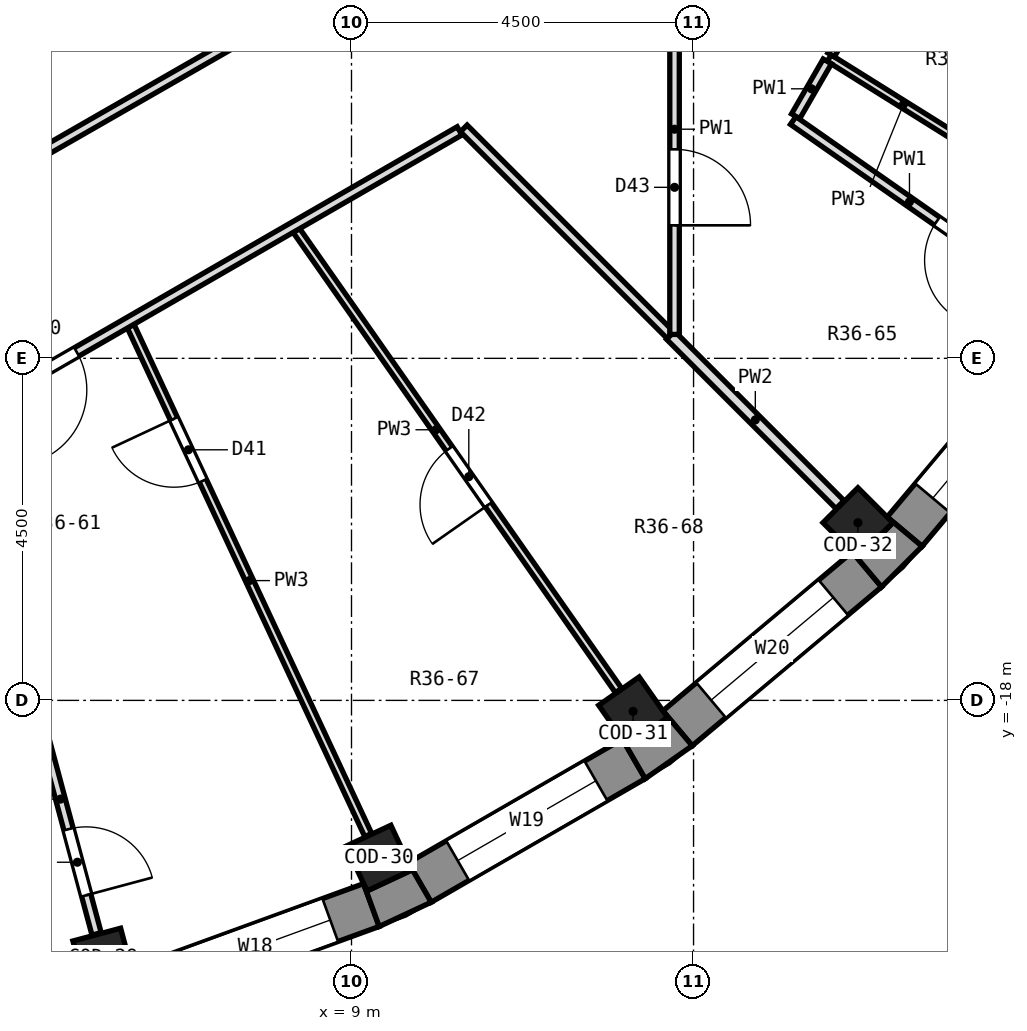
"""IFC4 building model, lengths in metres.
Left out: names, types, materials, properties, quantities, classifications, styles, units other than length and angle.
Written with IfcOpenShell. Run it as: python <this file> out.ifc"""

import sys

from ifc_helpers import new_model, si_unit, direction, frame, frame_2d, origin, origin_2d, place, context, subcontext, project, spatial, polyline, rectangle, outline, extrude, element, fill, save


model = new_model("IFC4")
c1 = context("Model", 3, precision=1e-05, world=origin(), true_north=direction((0.0, 1.0)))
c2 = subcontext(c1, "Body", "Model", "MODEL_VIEW")
j1 = project(units=[si_unit("LENGTHUNIT", "METRE"), si_unit("PLANEANGLEUNIT", "RADIAN")], contexts=[c1])
p1 = place(None, origin())
s1 = spatial("IfcSite", under=j1, at=p1, CompositionType="ELEMENT")
p2 = place(p1, origin())
s2 = spatial("IfcBuilding", under=s1, at=p2, CompositionType="ELEMENT")
p3 = place(p2, frame((0.0, 0.0, 259.4)))
s3 = spatial("IfcBuildingStorey", under=s2, at=p3, CompositionType="ELEMENT", Elevation=259.4)
for number, where, z_axis, x_axis in (
    (1, (5.733, -21.395, 0.0), (0.0, 0.0, 1.0), (0.259, -0.966, 0.0)),
    (2, (9.361, -20.075, 0.0), (0.0, 0.0, 1.0), (0.423, -0.906, 0.0)),
    (3, (12.705, -18.144, 0.0), (0.0, 0.0, 1.0), (0.574, -0.819, 0.0)),
    (4, (15.662, -15.662, 0.0), (0.0, 0.0, 1.0), (0.707, -0.707, 0.0)),
):
    element("IfcColumn", number, at=place(p3, frame(where, z_axis=z_axis, x_axis=x_axis)), inside=s3, PredefinedType="COLUMN", context=c2, shape_type="SweptSolid", body=[
        extrude(rectangle(XDim=0.65, YDim=0.65, at=origin_2d()), origin(), (0.0, 0.0, 1.0), 3.3),
    ])
p4 = place(p3, frame((6.206, -21.805, 0.0), z_axis=(0.0, 0.0, 1.0), x_axis=(0.939679383794, 0.342056509473, 0.0)))
e5 = element("IfcWall", 5, at=p4, inside=s3, PredefinedType="SOLIDWALL", context=c2, shape_type="SweptSolid", body=[
    extrude(rectangle(XDim=3.252, YDim=0.6, at=frame_2d((1.626, 0.0))), origin(), (0.0, 0.0, 1.0), 2.9),
])
p5 = place(p4, frame((0.576, 0.0, 0.9)))
e6 = element("IfcOpeningElement", 6, at=p5, cuts=e5, PredefinedType="OPENING", context=c2, shape_type="SweptSolid", body=[
    extrude(rectangle(XDim=2.1, YDim=1.8, at=frame_2d((1.05, 0.9))), frame((0.0, 0.312, 0.0), z_axis=(0.0, -1.0, 0.0), x_axis=(1.0, 0.0, 0.0)), (0.0, 0.0, 1.0), 0.624),
])
p6 = place(p3, frame((9.898, -20.396, 0.0), z_axis=(0.0, 0.0, 1.0), x_axis=(0.866016800201, 0.500014901547, 0.0)))
e7 = element("IfcWall", 7, at=p6, inside=s3, PredefinedType="SOLIDWALL", context=c2, shape_type="SweptSolid", body=[
    extrude(rectangle(XDim=3.252, YDim=0.6, at=frame_2d((1.626, 0.0))), origin(), (0.0, 0.0, 1.0), 2.9),
])
p7 = place(p6, frame((0.576, 0.0, 0.9)))
e8 = element("IfcOpeningElement", 8, at=p7, cuts=e7, PredefinedType="OPENING", context=c2, shape_type="SweptSolid", body=[
    extrude(rectangle(XDim=2.1, YDim=1.8, at=frame_2d((1.05, 0.9))), frame((0.0, 0.312, 0.0), z_axis=(0.0, -1.0, 0.0), x_axis=(1.0, 0.0, 0.0)), (0.0, 0.0, 1.0), 0.624),
])
p8 = place(p3, frame((13.29, -18.367, 0.0), z_axis=(0.0, 0.0, 1.0), x_axis=(0.766056773982, 0.64277291405, 0.0)))
e9 = element("IfcWall", 9, at=p8, inside=s3, PredefinedType="SOLIDWALL", context=c2, shape_type="SweptSolid", body=[
    extrude(rectangle(XDim=3.252, YDim=0.6, at=frame_2d((1.626, 0.0))), origin(), (0.0, 0.0, 1.0), 2.9),
])
p9 = place(p8, frame((0.576, 0.0, 0.9)))
e10 = element("IfcOpeningElement", 10, at=p9, cuts=e9, PredefinedType="OPENING", context=c2, shape_type="SweptSolid", body=[
    extrude(rectangle(XDim=2.1, YDim=1.8, at=frame_2d((1.05, 0.9))), frame((0.0, 0.312, 0.0), z_axis=(0.0, -1.0, 0.0), x_axis=(1.0, 0.0, 0.0)), (0.0, 0.0, 1.0), 0.624),
])
p10 = place(p3, frame((16.277, -15.781, 0.0), z_axis=(0.0, 0.0, 1.0), x_axis=(0.64277291405, 0.766056773982, 0.0)))
e11 = element("IfcWall", 11, at=p10, inside=s3, PredefinedType="SOLIDWALL", context=c2, shape_type="SweptSolid", body=[
    extrude(rectangle(XDim=3.252, YDim=0.6, at=frame_2d((1.626, 0.0))), origin(), (0.0, 0.0, 1.0), 2.9),
])
p11 = place(p10, frame((0.576, 0.0, 0.9)))
e12 = element("IfcOpeningElement", 12, at=p11, cuts=e11, PredefinedType="OPENING", context=c2, shape_type="SweptSolid", body=[
    extrude(rectangle(XDim=2.1, YDim=1.8, at=frame_2d((1.05, 0.9))), frame((0.0, 0.312, 0.0), z_axis=(0.0, -1.0, 0.0), x_axis=(1.0, 0.0, 0.0)), (0.0, 0.0, 1.0), 0.624),
])
p12 = place(p3, origin())
e13 = element("IfcWall", 13, at=p12, inside=s3, PredefinedType="SOLIDWALL", context=c2, shape_type="SweptSolid", body=[
    extrude(outline(polyline([(9.364, -20.975), (10.048, -20.656), (9.748, -20.136), (9.793, -20.232), (9.204, -20.507), (9.159, -20.411), (9.364, -20.975)])), origin(), (0.0, 0.0, 1.0), 2.9),
])
p13 = place(p3, origin())
e14 = element("IfcWall", 14, at=p13, inside=s3, PredefinedType="SOLIDWALL", context=c2, shape_type="SweptSolid", body=[
    extrude(outline(polyline([(12.864, -19.03), (13.482, -18.597), (13.097, -18.137), (13.157, -18.224), (12.625, -18.597), (12.564, -18.51), (12.864, -19.03)])), origin(), (0.0, 0.0, 1.0), 2.9),
])
p14 = place(p3, origin())
e15 = element("IfcWall", 15, at=p14, inside=s3, PredefinedType="SOLIDWALL", context=c2, shape_type="SweptSolid", body=[
    extrude(outline(polyline([(16.507, -15.973), (16.047, -15.588), (16.122, -15.662), (15.662, -16.122), (15.588, -16.047), (15.973, -16.507), (16.507, -15.973)])), origin(), (0.0, 0.0, 1.0), 2.9),
])
p15 = place(p3, frame((4.695, -17.526, 0.0), z_axis=(0.0, 0.0, 1.0), x_axis=(0.259210267256, -0.965820913705, 0.0)))
e16 = element("IfcWall", 16, at=p15, inside=s3, PredefinedType="PARTITIONING", context=c2, shape_type="SweptSolid", body=[
    extrude(rectangle(XDim=3.671, YDim=0.125, at=frame_2d((1.836, 0.0))), origin(), (0.0, 0.0, 1.0), 2.9),
])
p16 = place(p15, frame((2.246, 0.0, 0.0)))
e17 = element("IfcOpeningElement", 17, at=p16, cuts=e16, PredefinedType="OPENING", context=c2, shape_type="SweptSolid", body=[
    extrude(rectangle(XDim=0.9, YDim=2.1, at=frame_2d((0.45, 1.05))), frame((0.0, 0.074, 0.0), z_axis=(0.0, -1.0, 0.0), x_axis=(1.0, 0.0, 0.0)), (0.0, 0.0, 1.0), 0.149),
])
p17 = place(p3, frame((6.095, -13.077, 0.0), z_axis=(0.0, 0.0, 1.0), x_axis=(0.422939739386, -0.906157810124, 0.0)))
e18 = element("IfcWall", 18, at=p17, inside=s3, PredefinedType="PARTITIONING", context=c2, shape_type="SweptSolid", body=[
    extrude(rectangle(XDim=7.388, YDim=0.1, at=frame_2d((3.694, 0.0))), origin(), (0.0, 0.0, 1.0), 2.9),
])
p18 = place(p17, frame((1.345, 0.0, 0.0)))
e19 = element("IfcOpeningElement", 19, at=p18, cuts=e18, PredefinedType="OPENING", context=c2, shape_type="SweptSolid", body=[
    extrude(rectangle(XDim=0.9, YDim=2.1, at=frame_2d((0.45, 1.05))), frame((0.0, 0.062, 0.0), z_axis=(0.0, -1.0, 0.0), x_axis=(1.0, 0.0, 0.0)), (0.0, 0.0, 1.0), 0.124),
])
p19 = place(p3, frame((8.275, -11.818, 0.0), z_axis=(0.0, 0.0, 1.0), x_axis=(0.573597629831, -0.819137204046, 0.0)))
e20 = element("IfcWall", 20, at=p19, inside=s3, PredefinedType="PARTITIONING", context=c2, shape_type="SweptSolid", body=[
    extrude(rectangle(XDim=7.388, YDim=0.1, at=frame_2d((3.694, 0.0))), origin(), (0.0, 0.0, 1.0), 2.9),
])
p20 = place(p19, frame((3.504, 0.0, 0.0)))
e21 = element("IfcOpeningElement", 21, at=p20, cuts=e20, PredefinedType="OPENING", context=c2, shape_type="SweptSolid", body=[
    extrude(rectangle(XDim=0.9, YDim=2.1, at=frame_2d((0.45, 1.05))), frame((0.0, 0.062, 0.0), z_axis=(0.0, -1.0, 0.0), x_axis=(1.0, 0.0, 0.0)), (0.0, 0.0, 1.0), 0.124),
])
p21 = place(p3, frame((10.477, -10.475, 0.0), z_axis=(0.0, 0.0, 1.0), x_axis=(0.707106781187, -0.707106781187, 0.0)))
e22 = element("IfcWall", 22, at=p21, inside=s3, PredefinedType="PARTITIONING", context=c2, shape_type="SweptSolid", body=[
    extrude(rectangle(XDim=3.848, YDim=0.125, at=frame_2d((1.924, 0.0))), origin(), (0.0, 0.0, 1.0), 2.9),
])
p22 = place(p3, frame((13.198, -13.196, 0.0), z_axis=(0.0, 0.0, 1.0), x_axis=(0.707261695581, -0.706951832845, 0.0)))
e23 = element("IfcWall", 23, at=p22, inside=s3, PredefinedType="PARTITIONING", context=c2, shape_type="SweptSolid", body=[
    extrude(rectangle(XDim=3.152, YDim=0.15, at=frame_2d((1.576, 0.0))), origin(), (0.0, 0.0, 1.0), 2.9),
])
p23 = place(p3, frame((14.811, -10.371, 0.0), z_axis=(0.0, 0.0, 1.0), x_axis=(0.819345561084, -0.57329996645, 0.0)))
e24 = element("IfcWall", 24, at=p23, inside=s3, PredefinedType="PARTITIONING", context=c2, shape_type="SweptSolid", body=[
    extrude(rectangle(XDim=3.734, YDim=0.125, at=frame_2d((1.867, 0.0))), origin(), (0.0, 0.0, 1.0), 2.9),
])
p24 = place(p23, frame((2.308, 0.0, 0.0)))
e25 = element("IfcOpeningElement", 25, at=p24, cuts=e24, PredefinedType="OPENING", context=c2, shape_type="SweptSolid", body=[
    extrude(rectangle(XDim=0.9, YDim=2.1, at=frame_2d((0.45, 1.05))), frame((0.0, 0.074, 0.0), z_axis=(0.0, -1.0, 0.0), x_axis=(1.0, 0.0, 0.0)), (0.0, 0.0, 1.0), 0.149),
])
p25 = place(p3, frame((15.285, -9.55, 0.0), z_axis=(0.0, 0.0, 1.0), x_axis=(0.848022135911, -0.529960807047, 0.0)))
e26 = element("IfcWall", 26, at=p25, inside=s3, PredefinedType="PARTITIONING", context=c2, shape_type="SweptSolid", body=[
    extrude(rectangle(XDim=2.302, YDim=0.1, at=frame_2d((1.151, 0.0))), origin(), (0.0, 0.0, 1.0), 2.9),
])
p26 = place(p3, frame((3.216, -11.775, 0.0), z_axis=(0.0, 0.0, 1.0), x_axis=(0.86736732566, 0.497668486422, 0.0)))
e27 = element("IfcWall", 27, at=p26, inside=s3, PredefinedType="PARTITIONING", context=c2, shape_type="SweptSolid", body=[
    extrude(rectangle(XDim=6.202, YDim=0.125, at=frame_2d((3.101, 0.0))), origin(), (0.0, 0.0, 1.0), 2.9),
])
p27 = place(p3, frame((3.888, -14.279, 0.0), z_axis=(0.0, 0.0, 1.0), x_axis=(0.866068111199, 0.499926021291, 0.0)))
e28 = element("IfcWall", 28, at=p27, inside=s3, PredefinedType="PARTITIONING", context=c2, shape_type="SweptSolid", body=[
    extrude(rectangle(XDim=7.544, YDim=0.125, at=frame_2d((3.772, 0.0))), origin(), (0.0, 0.0, 1.0), 2.9),
])
p28 = place(p27, frame((0.727, 0.0, 0.0)))
e29 = element("IfcOpeningElement", 29, at=p28, cuts=e28, PredefinedType="OPENING", context=c2, shape_type="SweptSolid", body=[
    extrude(rectangle(XDim=1.0, YDim=2.1, at=frame_2d((0.5, 1.05))), frame((0.0, 0.074, 0.0), z_axis=(0.0, -1.0, 0.0), x_axis=(1.0, 0.0, 0.0)), (0.0, 0.0, 1.0), 0.149),
])
p29 = place(p3, frame((15.31, -9.507, 0.0), z_axis=(0.0, 0.0, 1.0), x_axis=(0.503206273965, 0.864166329963, 0.0)))
e30 = element("IfcWall", 30, at=p29, inside=s3, PredefinedType="PARTITIONING", context=c2, shape_type="SweptSolid", body=[
    extrude(rectangle(XDim=0.297, YDim=0.1, at=frame_2d((0.148, 0.0))), origin(), (0.0, 0.0, 1.0), 2.9),
])
p30 = place(p3, frame((14.843, -10.315, 0.0), z_axis=(0.0, 0.0, 1.0), x_axis=(0.499950631041, 0.86605390509, 0.0)))
e31 = element("IfcWall", 31, at=p30, inside=s3, PredefinedType="PARTITIONING", context=c2, shape_type="SweptSolid", body=[
    extrude(rectangle(XDim=0.833, YDim=0.125, at=frame_2d((0.417, 0.0))), origin(), (0.0, 0.0, 1.0), 2.9),
])
p31 = place(p3, frame((13.25, -13.186, 0.0), z_axis=(0.0, 0.0, 1.0), x_axis=(0.0, 1.0, 0.0)))
e32 = element("IfcWall", 32, at=p31, inside=s3, PredefinedType="PARTITIONING", context=c2, shape_type="SweptSolid", body=[
    extrude(rectangle(XDim=3.935, YDim=0.125, at=frame_2d((1.967, 0.0))), origin(), (0.0, 0.0, 1.0), 2.9),
])
p32 = place(p31, frame((1.436, 0.0, 0.0)))
e33 = element("IfcOpeningElement", 33, at=p32, cuts=e32, PredefinedType="OPENING", context=c2, shape_type="SweptSolid", body=[
    extrude(rectangle(XDim=1.0, YDim=2.1, at=frame_2d((0.5, 1.05))), frame((0.0, 0.074, 0.0), z_axis=(0.0, -1.0, 0.0), x_axis=(1.0, 0.0, 0.0)), (0.0, 0.0, 1.0), 0.149),
])
p33 = place(p5, origin())
e34 = element("IfcWindow", 34, at=p33, inside=s3, PartitioningType="SINGLE_PANEL", PredefinedType="WINDOW", context=c2, shape_type="SweptSolid", body=[
    extrude(rectangle(XDim=2.1, YDim=1.8, at=frame_2d((1.05, 0.9))), frame((0.0, 0.18, 0.0), z_axis=(0.0, -1.0, 0.0), x_axis=(1.0, 0.0, 0.0)), (0.0, 0.0, 1.0), 0.06),
])
fill(e6, e34)
p34 = place(p7, origin())
e35 = element("IfcWindow", 35, at=p34, inside=s3, PartitioningType="SINGLE_PANEL", PredefinedType="WINDOW", context=c2, shape_type="SweptSolid", body=[
    extrude(rectangle(XDim=2.1, YDim=1.8, at=frame_2d((1.05, 0.9))), frame((0.0, 0.18, 0.0), z_axis=(0.0, -1.0, 0.0), x_axis=(1.0, 0.0, 0.0)), (0.0, 0.0, 1.0), 0.06),
])
fill(e8, e35)
p35 = place(p9, origin())
e36 = element("IfcWindow", 36, at=p35, inside=s3, PartitioningType="SINGLE_PANEL", PredefinedType="WINDOW", context=c2, shape_type="SweptSolid", body=[
    extrude(rectangle(XDim=2.1, YDim=1.8, at=frame_2d((1.05, 0.9))), frame((0.0, 0.18, 0.0), z_axis=(0.0, -1.0, 0.0), x_axis=(1.0, 0.0, 0.0)), (0.0, 0.0, 1.0), 0.06),
])
fill(e10, e36)
p36 = place(p11, origin())
e37 = element("IfcWindow", 37, at=p36, inside=s3, PartitioningType="SINGLE_PANEL", PredefinedType="WINDOW", context=c2, shape_type="SweptSolid", body=[
    extrude(rectangle(XDim=2.1, YDim=1.8, at=frame_2d((1.05, 0.9))), frame((0.0, 0.18, 0.0), z_axis=(0.0, -1.0, 0.0), x_axis=(1.0, 0.0, 0.0)), (0.0, 0.0, 1.0), 0.06),
])
fill(e12, e37)
p37 = place(p16, origin())
e38 = element("IfcDoor", 38, at=p37, inside=s3, OperationType="SINGLE_SWING_RIGHT", PredefinedType="DOOR", context=c2, shape_type="SweptSolid", body=[
    extrude(rectangle(XDim=0.9, YDim=2.1, at=frame_2d((0.45, 1.05))), frame((0.0, 0.025, 0.0), z_axis=(0.0, -1.0, 0.0), x_axis=(1.0, 0.0, 0.0)), (0.0, 0.0, 1.0), 0.05),
])
fill(e17, e38)
p38 = place(p28, frame((1.0, 0.0, 0.0), z_axis=(0.0, 0.0, 1.0), x_axis=(-1.0, 0.0, 0.0)))
e39 = element("IfcDoor", 39, at=p38, inside=s3, OperationType="SINGLE_SWING_RIGHT", PredefinedType="DOOR", context=c2, shape_type="SweptSolid", body=[
    extrude(rectangle(XDim=1.0, YDim=2.1, at=frame_2d((0.5, 1.05))), frame((0.0, 0.025, 0.0), z_axis=(0.0, -1.0, 0.0), x_axis=(1.0, 0.0, 0.0)), (0.0, 0.0, 1.0), 0.05),
])
fill(e29, e39)
p39 = place(p18, frame((0.9, 0.0, 0.0), z_axis=(0.0, 0.0, 1.0), x_axis=(-1.0, 0.0, 0.0)))
e40 = element("IfcDoor", 40, at=p39, inside=s3, OperationType="SINGLE_SWING_RIGHT", PredefinedType="DOOR", context=c2, shape_type="SweptSolid", body=[
    extrude(rectangle(XDim=0.9, YDim=2.1, at=frame_2d((0.45, 1.05))), frame((0.0, 0.025, 0.0), z_axis=(0.0, -1.0, 0.0), x_axis=(1.0, 0.0, 0.0)), (0.0, 0.0, 1.0), 0.05),
])
fill(e19, e40)
p40 = place(p20, frame((0.9, 0.0, 0.0), z_axis=(0.0, 0.0, 1.0), x_axis=(-1.0, 0.0, 0.0)))
e41 = element("IfcDoor", 41, at=p40, inside=s3, OperationType="SINGLE_SWING_LEFT", PredefinedType="DOOR", context=c2, shape_type="SweptSolid", body=[
    extrude(rectangle(XDim=0.9, YDim=2.1, at=frame_2d((0.45, 1.05))), frame((0.0, 0.025, 0.0), z_axis=(0.0, -1.0, 0.0), x_axis=(1.0, 0.0, 0.0)), (0.0, 0.0, 1.0), 0.05),
])
fill(e21, e41)
p41 = place(p32, frame((1.0, 0.0, 0.0), z_axis=(0.0, 0.0, 1.0), x_axis=(-1.0, 0.0, 0.0)))
e42 = element("IfcDoor", 42, at=p41, inside=s3, OperationType="SINGLE_SWING_RIGHT", PredefinedType="DOOR", context=c2, shape_type="SweptSolid", body=[
    extrude(rectangle(XDim=1.0, YDim=2.1, at=frame_2d((0.5, 1.05))), frame((0.0, 0.025, 0.0), z_axis=(0.0, -1.0, 0.0), x_axis=(1.0, 0.0, 0.0)), (0.0, 0.0, 1.0), 0.05),
])
fill(e33, e42)
p42 = place(p24, frame((0.9, 0.0, 0.0), z_axis=(0.0, 0.0, 1.0), x_axis=(-1.0, 0.0, 0.0)))
e43 = element("IfcDoor", 43, at=p42, inside=s3, OperationType="SINGLE_SWING_LEFT", PredefinedType="DOOR", context=c2, shape_type="SweptSolid", body=[
    extrude(rectangle(XDim=0.9, YDim=2.1, at=frame_2d((0.45, 1.05))), frame((0.0, 0.025, 0.0), z_axis=(0.0, -1.0, 0.0), x_axis=(1.0, 0.0, 0.0)), (0.0, 0.0, 1.0), 0.05),
])
fill(e25, e43)
save(model, sys.argv[1])
